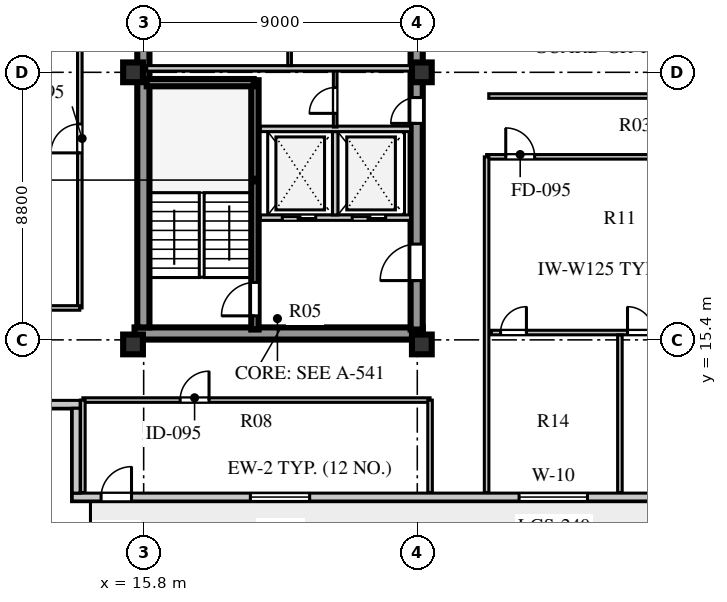
"""IFC4 building model, lengths in metres.
Left out: names, types, materials, properties, quantities, classifications, styles, units other than length and angle.
Written with IfcOpenShell. Run it as: python <this file> out.ifc"""

import sys

from ifc_helpers import new_model, si_unit, direction, frame, frame_2d, origin, origin_2d, place, context, subcontext, project, spatial, rectangle, extrude, element, fill, save


model = new_model("IFC4")
c1 = context("Model", 3, precision=1e-05, world=origin(), true_north=direction((0.0, 1.0)))
c2 = subcontext(c1, "Body", "Model", "MODEL_VIEW")
j1 = project(units=[si_unit("LENGTHUNIT", "METRE"), si_unit("PLANEANGLEUNIT", "RADIAN")], contexts=[c1])
p1 = place(None, origin())
s1 = spatial("IfcSite", under=j1, at=p1, CompositionType="ELEMENT")
p2 = place(p1, origin())
s2 = spatial("IfcBuilding", under=s1, at=p2, CompositionType="ELEMENT")
p3 = place(p2, frame((0.0, 0.0, 320.1)))
s3 = spatial("IfcBuildingStorey", under=s2, at=p3, CompositionType="ELEMENT", Elevation=320.1)
p4 = place(p3, frame((15.5, 15.61, 0.0), z_axis=(0.0, 0.0, 1.0), x_axis=(1.0, 0.0, 0.0)))
e1 = element("IfcWall", 1, at=p4, inside=s3, PredefinedType="SHEAR", context=c2, shape_type="SweptSolid", body=[
    extrude(rectangle(XDim=9.48, YDim=0.4, at=frame_2d((4.74, 0.0))), origin(), (0.0, 0.0, 1.0), 3.56),
])
p5 = place(p3, frame((15.79, 15.81, 0.0), z_axis=(0.0, 0.0, 1.0), x_axis=(0.0, 1.0, 0.0)))
e2 = element("IfcWall", 2, at=p5, inside=s3, PredefinedType="SHEAR", context=c2, shape_type="SweptSolid", body=[
    extrude(rectangle(XDim=25.63, YDim=0.4, at=frame_2d((12.815, 0.0))), origin(), (0.0, 0.0, 1.0), 3.56),
])
p6 = place(p3, frame((24.78, 15.74, 0.0), z_axis=(0.0, 0.0, 1.0), x_axis=(0.0, 1.0, 0.0)))
e3 = element("IfcWall", 3, at=p6, inside=s3, PredefinedType="SHEAR", context=c2, shape_type="SweptSolid", body=[
    extrude(rectangle(XDim=25.76, YDim=0.4, at=frame_2d((12.88, 0.0))), origin(), (0.0, 0.0, 1.0), 3.56),
])
p7 = place(p6, frame((1.61, 0.0, 0.0)))
e4 = element("IfcOpeningElement", 4, at=p7, cuts=e3, PredefinedType="OPENING", context=c2, shape_type="SweptSolid", body=[
    extrude(rectangle(XDim=1.2, YDim=2.1, at=frame_2d((0.6, 1.05))), frame((0.0, 0.21, 0.0), z_axis=(0.0, -1.0, 0.0), x_axis=(1.0, 0.0, 0.0)), (0.0, 0.0, 1.0), 0.42),
])
p8 = place(p6, frame((6.78, 0.0, 0.0)))
e5 = element("IfcOpeningElement", 5, at=p8, cuts=e3, PredefinedType="OPENING", context=c2, shape_type="SweptSolid", body=[
    extrude(rectangle(XDim=0.85, YDim=2.06, at=frame_2d((0.425, 1.03))), frame((0.0, 0.21, 0.0), z_axis=(0.0, -1.0, 0.0), x_axis=(1.0, 0.0, 0.0)), (0.0, 0.0, 1.0), 0.42),
])
p9 = place(p6, frame((12.11, 0.0, 0.0)))
e6 = element("IfcOpeningElement", 6, at=p9, cuts=e3, PredefinedType="OPENING", context=c2, shape_type="SweptSolid", body=[
    extrude(rectangle(XDim=1.5, YDim=2.12, at=frame_2d((0.75, 1.06))), frame((0.0, 0.21, 0.0), z_axis=(0.0, -1.0, 0.0), x_axis=(1.0, 0.0, 0.0)), (0.0, 0.0, 1.0), 0.42),
])
p10 = place(p6, frame((20.11, 0.0, 0.0)))
e7 = element("IfcOpeningElement", 7, at=p10, cuts=e3, PredefinedType="OPENING", context=c2, shape_type="SweptSolid", body=[
    extrude(rectangle(XDim=1.2, YDim=2.12, at=frame_2d((0.6, 1.06))), frame((0.0, 0.21, 0.0), z_axis=(0.0, -1.0, 0.0), x_axis=(1.0, 0.0, 0.0)), (0.0, 0.0, 1.0), 0.42),
])
p11 = place(p6, frame((24.01, 0.0, 0.0)))
e8 = element("IfcOpeningElement", 8, at=p11, cuts=e3, PredefinedType="OPENING", context=c2, shape_type="SweptSolid", body=[
    extrude(rectangle(XDim=0.95, YDim=2.1, at=frame_2d((0.475, 1.05))), frame((0.0, 0.21, 0.0), z_axis=(0.0, -1.0, 0.0), x_axis=(1.0, 0.0, 0.0)), (0.0, 0.0, 1.0), 0.42),
])
for number, where, z_axis, x_axis in (
    (9, (15.45, 15.25, 0.0), (0.0, 0.0, 1.0), (1.0, 0.0, 0.0)),
    (10, (15.45, 24.2, 0.0), (0.0, 0.0, 1.0), (1.0, 0.0, 0.0)),
    (11, (24.95, 15.25, 0.0), (0.0, 0.0, 1.0), (1.0, 0.0, 0.0)),
    (12, (24.95, 24.2, 0.0), (0.0, 0.0, 1.0), (1.0, 0.0, 0.0)),
):
    element("IfcColumn", number, at=place(p3, frame(where, z_axis=z_axis, x_axis=x_axis)), inside=s3, PredefinedType="COLUMN", context=c2, shape_type="SweptSolid", body=[
        extrude(rectangle(XDim=0.65, YDim=0.65, at=origin_2d()), origin(), (0.0, 0.0, 1.0), 3.56),
    ])
p12 = place(p3, frame((13.45, 10.23, 0.0), z_axis=(0.0, 0.0, 1.0), x_axis=(1.0, 0.0, 0.0)))
e13 = element("IfcWall", 13, at=p12, inside=s3, PredefinedType="SOLIDWALL", context=c2, shape_type="SweptSolid", body=[
    extrude(rectangle(XDim=31.7, YDim=0.26, at=frame_2d((15.85, 0.0))), origin(), (0.0, 0.0, 1.0), 3.56),
])
p13 = place(p12, frame((0.95, 0.0, 0.0)))
e14 = element("IfcOpeningElement", 14, at=p13, cuts=e13, PredefinedType="OPENING", context=c2, shape_type="SweptSolid", body=[
    extrude(rectangle(XDim=1.0, YDim=2.05, at=frame_2d((0.5, 1.025))), frame((0.0, 0.14, 0.0), z_axis=(0.0, -1.0, 0.0), x_axis=(1.0, 0.0, 0.0)), (0.0, 0.0, 1.0), 0.28),
])
p14 = place(p12, frame((5.86, 0.0, 0.8)))
e15 = element("IfcOpeningElement", 15, at=p14, cuts=e13, PredefinedType="OPENING", context=c2, shape_type="SweptSolid", body=[
    extrude(rectangle(XDim=1.95, YDim=2.0, at=frame_2d((0.975, 1.0))), frame((0.0, 0.14, 0.0), z_axis=(0.0, -1.0, 0.0), x_axis=(1.0, 0.0, 0.0)), (0.0, 0.0, 1.0), 0.28),
])
p15 = place(p12, frame((14.698, 0.0, 0.8)))
e16 = element("IfcOpeningElement", 16, at=p15, cuts=e13, PredefinedType="OPENING", context=c2, shape_type="SweptSolid", body=[
    extrude(rectangle(XDim=2.25, YDim=2.0, at=frame_2d((1.125, 1.0))), frame((0.0, 0.14, 0.0), z_axis=(0.0, -1.0, 0.0), x_axis=(1.0, 0.0, 0.0)), (0.0, 0.0, 1.0), 0.28),
])
p16 = place(p12, frame((20.958, 0.0, 0.8)))
e17 = element("IfcOpeningElement", 17, at=p16, cuts=e13, PredefinedType="OPENING", context=c2, shape_type="SweptSolid", body=[
    extrude(rectangle(XDim=1.8, YDim=2.0, at=frame_2d((0.9, 1.0))), frame((0.0, 0.14, 0.0), z_axis=(0.0, -1.0, 0.0), x_axis=(1.0, 0.0, 0.0)), (0.0, 0.0, 1.0), 0.28),
])
p17 = place(p12, frame((27.895, 0.0, 0.8)))
e18 = element("IfcOpeningElement", 18, at=p17, cuts=e13, PredefinedType="OPENING", context=c2, shape_type="SweptSolid", body=[
    extrude(rectangle(XDim=1.5, YDim=2.0, at=frame_2d((0.75, 1.0))), frame((0.0, 0.14, 0.0), z_axis=(0.0, -1.0, 0.0), x_axis=(1.0, 0.0, 0.0)), (0.0, 0.0, 1.0), 0.28),
])
p18 = place(p3, frame((10.4, 13.28, 0.0), z_axis=(0.0, 0.0, 1.0), x_axis=(1.0, 0.0, 0.0)))
e19 = element("IfcWall", 19, at=p18, inside=s3, PredefinedType="SOLIDWALL", context=c2, shape_type="SweptSolid", body=[
    extrude(rectangle(XDim=3.31, YDim=0.26, at=frame_2d((1.655, 0.0))), origin(), (0.0, 0.0, 1.0), 3.56),
])
p19 = place(p3, frame((13.58, 13.15, 0.0), z_axis=(0.0, 0.0, 1.0), x_axis=(0.0, -1.0, 0.0)))
e20 = element("IfcWall", 20, at=p19, inside=s3, PredefinedType="SOLIDWALL", context=c2, shape_type="SweptSolid", body=[
    extrude(rectangle(XDim=2.79, YDim=0.26, at=frame_2d((1.395, 0.0))), origin(), (0.0, 0.0, 1.0), 3.56),
])
p20 = place(p3, frame((19.46, 15.74, 0.0), z_axis=(0.0, 0.0, 1.0), x_axis=(0.0, 1.0, 0.0)))
e21 = element("IfcWall", 21, at=p20, inside=s3, PredefinedType="SHEAR", context=c2, shape_type="SweptSolid", body=[
    extrude(rectangle(XDim=8.2, YDim=0.24, at=frame_2d((4.1, 0.0))), origin(), (0.0, 0.0, 1.0), 3.8),
])
p21 = place(p20, frame((0.45, 0.0, 0.0)))
e22 = element("IfcOpeningElement", 22, at=p21, cuts=e21, PredefinedType="OPENING", context=c2, shape_type="SweptSolid", body=[
    extrude(rectangle(XDim=1.1, YDim=2.1, at=frame_2d((0.55, 1.05))), frame((0.0, 0.13, 0.0), z_axis=(0.0, -1.0, 0.0), x_axis=(1.0, 0.0, 0.0)), (0.0, 0.0, 1.0), 0.26),
])
p22 = place(p3, frame((15.9, 23.86, 0.0), z_axis=(0.0, 0.0, 1.0), x_axis=(1.0, 0.0, 0.0)))
e23 = element("IfcWall", 23, at=p22, inside=s3, PredefinedType="SHEAR", context=c2, shape_type="SweptSolid", body=[
    extrude(rectangle(XDim=3.52, YDim=0.24, at=frame_2d((1.76, 0.0))), origin(), (0.0, 0.0, 1.0), 3.8),
])
p23 = place(p3, frame((19.64, 19.42, 0.0), z_axis=(0.0, 0.0, 1.0), x_axis=(1.0, 0.0, 0.0)))
e24 = element("IfcWall", 24, at=p23, inside=s3, PredefinedType="SOLIDWALL", context=c2, shape_type="SweptSolid", body=[
    extrude(rectangle(XDim=4.94, YDim=0.18, at=frame_2d((2.47, 0.0))), origin(), (0.0, 0.0, 1.0), 3.56),
])
p24 = place(p23, frame((0.72, 0.0, 0.0)))
e25 = element("IfcOpeningElement", 25, at=p24, cuts=e24, PredefinedType="OPENING", context=c2, shape_type="SweptSolid", body=[
    extrude(rectangle(XDim=1.1, YDim=2.1, at=frame_2d((0.55, 1.05))), frame((0.0, 0.1, 0.0), z_axis=(0.0, -1.0, 0.0), x_axis=(1.0, 0.0, 0.0)), (0.0, 0.0, 1.0), 0.2),
])
p25 = place(p23, frame((3.02, 0.0, 0.0)))
e26 = element("IfcOpeningElement", 26, at=p25, cuts=e24, PredefinedType="OPENING", context=c2, shape_type="SweptSolid", body=[
    extrude(rectangle(XDim=1.1, YDim=2.1, at=frame_2d((0.55, 1.05))), frame((0.0, 0.1, 0.0), z_axis=(0.0, -1.0, 0.0), x_axis=(1.0, 0.0, 0.0)), (0.0, 0.0, 1.0), 0.2),
])
p26 = place(p3, frame((22.1, 19.51, 0.0), z_axis=(0.0, 0.0, 1.0), x_axis=(0.0, 1.0, 0.0)))
e27 = element("IfcWall", 27, at=p26, inside=s3, PredefinedType="SOLIDWALL", context=c2, shape_type="SweptSolid", body=[
    extrude(rectangle(XDim=2.74, YDim=0.18, at=frame_2d((1.37, 0.0))), origin(), (0.0, 0.0, 1.0), 3.56),
])
p27 = place(p3, frame((19.64, 22.34, 0.0), z_axis=(0.0, 0.0, 1.0), x_axis=(1.0, 0.0, 0.0)))
e28 = element("IfcWall", 28, at=p27, inside=s3, PredefinedType="SOLIDWALL", context=c2, shape_type="SweptSolid", body=[
    extrude(rectangle(XDim=4.94, YDim=0.18, at=frame_2d((2.47, 0.0))), origin(), (0.0, 0.0, 1.0), 3.56),
])
p28 = place(p3, frame((22.1, 22.4, 0.0), z_axis=(0.0, 0.0, 1.0), x_axis=(0.0, 1.0, 0.0)))
e29 = element("IfcWall", 29, at=p28, inside=s3, PredefinedType="PARTITIONING", context=c2, shape_type="SweptSolid", body=[
    extrude(rectangle(XDim=1.88, YDim=0.12, at=frame_2d((0.94, 0.0))), origin(), (0.0, 0.0, 1.0), 3.56),
])
p29 = place(p28, frame((0.45, 0.0, 0.0)))
e30 = element("IfcOpeningElement", 30, at=p29, cuts=e29, PredefinedType="OPENING", context=c2, shape_type="SweptSolid", body=[
    extrude(rectangle(XDim=0.85, YDim=2.06, at=frame_2d((0.425, 1.03))), frame((0.0, 0.07, 0.0), z_axis=(0.0, -1.0, 0.0), x_axis=(1.0, 0.0, 0.0)), (0.0, 0.0, 1.0), 0.14),
])
p30 = place(p3, frame((15.9, 24.33, 0.0), z_axis=(0.0, 0.0, 1.0), x_axis=(1.0, 0.0, 0.0)))
e31 = element("IfcWall", 31, at=p30, inside=s3, PredefinedType="SOLIDWALL", context=c2, shape_type="SweptSolid", body=[
    extrude(rectangle(XDim=8.68, YDim=0.18, at=frame_2d((4.34, 0.0))), origin(), (0.0, 0.0, 1.0), 2.96),
])
p31 = place(p3, frame((20.6, 24.42, 0.0), z_axis=(0.0, 0.0, 1.0), x_axis=(0.0, 1.0, 0.0)))
e32 = element("IfcWall", 32, at=p31, inside=s3, PredefinedType="PARTITIONING", context=c2, shape_type="SweptSolid", body=[
    extrude(rectangle(XDim=2.02, YDim=0.12, at=frame_2d((1.01, 0.0))), origin(), (0.0, 0.0, 1.0), 3.56),
])
p32 = place(p3, frame((27.08, 21.42, 0.0), z_axis=(0.0, 0.0, 1.0), x_axis=(1.0, 0.0, 0.0)))
e33 = element("IfcWall", 33, at=p32, inside=s3, PredefinedType="PARTITIONING", context=c2, shape_type="SweptSolid", body=[
    extrude(rectangle(XDim=12.07, YDim=0.15, at=frame_2d((6.035, 0.0))), origin(), (0.0, 0.0, 1.0), 3.26),
])
p33 = place(p32, frame((0.63, 0.0, 0.0)))
e34 = element("IfcOpeningElement", 34, at=p33, cuts=e33, PredefinedType="OPENING", context=c2, shape_type="SweptSolid", body=[
    extrude(rectangle(XDim=0.95, YDim=2.1, at=frame_2d((0.475, 1.05))), frame((0.0, 0.085, 0.0), z_axis=(0.0, -1.0, 0.0), x_axis=(1.0, 0.0, 0.0)), (0.0, 0.0, 1.0), 0.17),
])
p34 = place(p3, frame((27.08, 10.38, 0.0), z_axis=(0.0, 0.0, 1.0), x_axis=(0.0, 1.0, 0.0)))
e35 = element("IfcWall", 35, at=p34, inside=s3, PredefinedType="PARTITIONING", context=c2, shape_type="SweptSolid", body=[
    extrude(rectangle(XDim=11.04, YDim=0.15, at=frame_2d((5.52, 0.0))), origin(), (0.0, 0.0, 1.0), 3.56),
])
p35 = place(p3, frame((27.15, 23.42, 0.0), z_axis=(0.0, 0.0, 1.0), x_axis=(1.0, 0.0, 0.0)))
e36 = element("IfcWall", 36, at=p35, inside=s3, PredefinedType="PARTITIONING", context=c2, shape_type="SweptSolid", body=[
    extrude(rectangle(XDim=6.0, YDim=0.15, at=frame_2d((3.0, 0.0))), origin(), (0.0, 0.0, 1.0), 3.56),
])
p36 = place(p3, frame((13.8, 13.42, 0.0), z_axis=(0.0, 0.0, 1.0), x_axis=(1.0, 0.0, 0.0)))
e37 = element("IfcWall", 37, at=p36, inside=s3, PredefinedType="PARTITIONING", context=c2, shape_type="SweptSolid", body=[
    extrude(rectangle(XDim=11.42, YDim=0.15, at=frame_2d((5.71, 0.0))), origin(), (0.0, 0.0, 1.0), 3.56),
])
p37 = place(p36, frame((3.2, 0.0, 0.0)))
e38 = element("IfcOpeningElement", 38, at=p37, cuts=e37, PredefinedType="OPENING", context=c2, shape_type="SweptSolid", body=[
    extrude(rectangle(XDim=0.95, YDim=2.08, at=frame_2d((0.475, 1.04))), frame((0.0, 0.085, 0.0), z_axis=(0.0, -1.0, 0.0), x_axis=(1.0, 0.0, 0.0)), (0.0, 0.0, 1.0), 0.17),
])
p38 = place(p3, frame((13.8, 10.38, 0.0), z_axis=(0.0, 0.0, 1.0), x_axis=(0.0, 1.0, 0.0)))
e39 = element("IfcWall", 39, at=p38, inside=s3, PredefinedType="PARTITIONING", context=c2, shape_type="SweptSolid", body=[
    extrude(rectangle(XDim=3.04, YDim=0.15, at=frame_2d((1.52, 0.0))), origin(), (0.0, 0.0, 1.0), 3.56),
])
p39 = place(p3, frame((25.22, 10.38, 0.0), z_axis=(0.0, 0.0, 1.0), x_axis=(0.0, 1.0, 0.0)))
e40 = element("IfcWall", 40, at=p39, inside=s3, PredefinedType="PARTITIONING", context=c2, shape_type="SweptSolid", body=[
    extrude(rectangle(XDim=3.04, YDim=0.15, at=frame_2d((1.52, 0.0))), origin(), (0.0, 0.0, 1.0), 3.11),
])
p40 = place(p3, frame((13.7, 16.45, 0.0), z_axis=(0.0, 0.0, 1.0), x_axis=(0.0, 1.0, 0.0)))
e41 = element("IfcWall", 41, at=p40, inside=s3, PredefinedType="PARTITIONING", context=c2, shape_type="SweptSolid", body=[
    extrude(rectangle(XDim=24.3, YDim=0.15, at=frame_2d((12.15, 0.0))), origin(), (0.0, 0.0, 1.0), 3.56),
])
p41 = place(p40, frame((5.1, 0.0, 0.0)))
e42 = element("IfcOpeningElement", 42, at=p41, cuts=e41, PredefinedType="OPENING", context=c2, shape_type="SweptSolid", body=[
    extrude(rectangle(XDim=0.95, YDim=2.08, at=frame_2d((0.475, 1.04))), frame((0.0, 0.085, 0.0), z_axis=(0.0, -1.0, 0.0), x_axis=(1.0, 0.0, 0.0)), (0.0, 0.0, 1.0), 0.17),
])
p42 = place(p3, frame((10.68, 16.45, 0.0), z_axis=(0.0, 0.0, 1.0), x_axis=(1.0, 0.0, 0.0)))
e43 = element("IfcWall", 43, at=p42, inside=s3, PredefinedType="PARTITIONING", context=c2, shape_type="SweptSolid", body=[
    extrude(rectangle(XDim=3.02, YDim=0.15, at=frame_2d((1.51, 0.0))), origin(), (0.0, 0.0, 1.0), 3.56),
])
p43 = place(p3, frame((27.24, 15.641, 0.0), z_axis=(0.0, 0.0, 1.0), x_axis=(1.0, 0.0, 0.0)))
e44 = element("IfcWall", 44, at=p43, inside=s3, PredefinedType="PARTITIONING", context=c2, shape_type="SweptSolid", body=[
    extrude(rectangle(XDim=11.83, YDim=0.15, at=frame_2d((5.915, 0.0))), origin(), (0.0, 0.0, 1.0), 3.56),
])
p44 = place(p43, frame((0.3, 0.0, 0.0)))
e45 = element("IfcOpeningElement", 45, at=p44, cuts=e44, PredefinedType="OPENING", context=c2, shape_type="SweptSolid", body=[
    extrude(rectangle(XDim=0.85, YDim=2.08, at=frame_2d((0.425, 1.04))), frame((0.0, 0.085, 0.0), z_axis=(0.0, -1.0, 0.0), x_axis=(1.0, 0.0, 0.0)), (0.0, 0.0, 1.0), 0.17),
])
p45 = place(p43, frame((4.475, 0.0, 0.0)))
e46 = element("IfcOpeningElement", 46, at=p45, cuts=e44, PredefinedType="OPENING", context=c2, shape_type="SweptSolid", body=[
    extrude(rectangle(XDim=0.85, YDim=2.08, at=frame_2d((0.425, 1.04))), frame((0.0, 0.085, 0.0), z_axis=(0.0, -1.0, 0.0), x_axis=(1.0, 0.0, 0.0)), (0.0, 0.0, 1.0), 0.17),
])
p46 = place(p3, frame((31.465, 10.38, 0.0), z_axis=(0.0, 0.0, 1.0), x_axis=(0.0, 1.0, 0.0)))
e47 = element("IfcWall", 47, at=p46, inside=s3, PredefinedType="PARTITIONING", context=c2, shape_type="SweptSolid", body=[
    extrude(rectangle(XDim=5.181, YDim=0.15, at=frame_2d((2.591, 0.0))), origin(), (0.0, 0.0, 1.0), 3.56),
])
p47 = place(p13, frame((1.0, 0.0, 0.0), z_axis=(0.0, 0.0, 1.0), x_axis=(-1.0, 0.0, 0.0)))
e48 = element("IfcDoor", 48, at=p47, inside=s3, OperationType="SINGLE_SWING_LEFT", PredefinedType="DOOR", context=c2, shape_type="SweptSolid", body=[
    extrude(rectangle(XDim=1.0, YDim=2.05, at=frame_2d((0.5, 1.025))), frame((0.0, 0.025, 0.0), z_axis=(0.0, -1.0, 0.0), x_axis=(1.0, 0.0, 0.0)), (0.0, 0.0, 1.0), 0.05),
])
fill(e14, e48)
p48 = place(p14, origin())
e49 = element("IfcWindow", 49, at=p48, inside=s3, PartitioningType="SINGLE_PANEL", PredefinedType="WINDOW", context=c2, shape_type="SweptSolid", body=[
    extrude(rectangle(XDim=1.95, YDim=2.0, at=frame_2d((0.975, 1.0))), frame((0.0, 0.03, 0.0), z_axis=(0.0, -1.0, 0.0), x_axis=(1.0, 0.0, 0.0)), (0.0, 0.0, 1.0), 0.06),
])
fill(e15, e49)
p49 = place(p15, origin())
e50 = element("IfcWindow", 50, at=p49, inside=s3, PartitioningType="SINGLE_PANEL", PredefinedType="WINDOW", context=c2, shape_type="SweptSolid", body=[
    extrude(rectangle(XDim=2.25, YDim=2.0, at=frame_2d((1.125, 1.0))), frame((0.0, 0.03, 0.0), z_axis=(0.0, -1.0, 0.0), x_axis=(1.0, 0.0, 0.0)), (0.0, 0.0, 1.0), 0.06),
])
fill(e16, e50)
p50 = place(p21, origin())
e51 = element("IfcDoor", 51, at=p50, inside=s3, OperationType="SINGLE_SWING_LEFT", PredefinedType="DOOR", context=c2, shape_type="SweptSolid", body=[
    extrude(rectangle(XDim=1.1, YDim=2.1, at=frame_2d((0.55, 1.05))), frame((0.0, 0.025, 0.0), z_axis=(0.0, -1.0, 0.0), x_axis=(1.0, 0.0, 0.0)), (0.0, 0.0, 1.0), 0.05),
])
fill(e22, e51)
p51 = place(p24, origin())
e52 = element("IfcDoor", 52, at=p51, inside=s3, OperationType="DOUBLE_DOOR_SLIDING", PredefinedType="DOOR", context=c2, shape_type="SweptSolid", body=[
    extrude(rectangle(XDim=1.1, YDim=2.1, at=frame_2d((0.55, 1.05))), frame((0.0, 0.025, 0.0), z_axis=(0.0, -1.0, 0.0), x_axis=(1.0, 0.0, 0.0)), (0.0, 0.0, 1.0), 0.05),
])
fill(e25, e52)
p52 = place(p25, origin())
e53 = element("IfcDoor", 53, at=p52, inside=s3, OperationType="DOUBLE_DOOR_SLIDING", PredefinedType="DOOR", context=c2, shape_type="SweptSolid", body=[
    extrude(rectangle(XDim=1.1, YDim=2.1, at=frame_2d((0.55, 1.05))), frame((0.0, 0.025, 0.0), z_axis=(0.0, -1.0, 0.0), x_axis=(1.0, 0.0, 0.0)), (0.0, 0.0, 1.0), 0.05),
])
fill(e26, e53)
p53 = place(p7, frame((1.2, 0.0, 0.0), z_axis=(0.0, 0.0, 1.0), x_axis=(-1.0, 0.0, 0.0)))
e54 = element("IfcDoor", 54, at=p53, inside=s3, OperationType="SINGLE_SWING_RIGHT", PredefinedType="DOOR", context=c2, shape_type="SweptSolid", body=[
    extrude(rectangle(XDim=1.2, YDim=2.1, at=frame_2d((0.6, 1.05))), frame((0.0, 0.025, 0.0), z_axis=(0.0, -1.0, 0.0), x_axis=(1.0, 0.0, 0.0)), (0.0, 0.0, 1.0), 0.05),
])
fill(e4, e54)
p54 = place(p29, origin())
e55 = element("IfcDoor", 55, at=p54, inside=s3, OperationType="SINGLE_SWING_LEFT", PredefinedType="DOOR", context=c2, shape_type="SweptSolid", body=[
    extrude(rectangle(XDim=0.85, YDim=2.06, at=frame_2d((0.425, 1.03))), frame((0.0, 0.025, 0.0), z_axis=(0.0, -1.0, 0.0), x_axis=(1.0, 0.0, 0.0)), (0.0, 0.0, 1.0), 0.05),
])
fill(e30, e55)
p55 = place(p8, frame((0.85, 0.0, 0.0), z_axis=(0.0, 0.0, 1.0), x_axis=(-1.0, 0.0, 0.0)))
e56 = element("IfcDoor", 56, at=p55, inside=s3, OperationType="SINGLE_SWING_RIGHT", PredefinedType="DOOR", context=c2, shape_type="SweptSolid", body=[
    extrude(rectangle(XDim=0.85, YDim=2.06, at=frame_2d((0.425, 1.03))), frame((0.0, 0.025, 0.0), z_axis=(0.0, -1.0, 0.0), x_axis=(1.0, 0.0, 0.0)), (0.0, 0.0, 1.0), 0.05),
])
fill(e5, e56)
p56 = place(p37, frame((0.95, 0.0, 0.0), z_axis=(0.0, 0.0, 1.0), x_axis=(-1.0, 0.0, 0.0)))
e57 = element("IfcDoor", 57, at=p56, inside=s3, OperationType="SINGLE_SWING_LEFT", PredefinedType="DOOR", context=c2, shape_type="SweptSolid", body=[
    extrude(rectangle(XDim=0.95, YDim=2.08, at=frame_2d((0.475, 1.04))), frame((0.0, 0.025, 0.0), z_axis=(0.0, -1.0, 0.0), x_axis=(1.0, 0.0, 0.0)), (0.0, 0.0, 1.0), 0.05),
])
fill(e38, e57)
p57 = place(p41, origin())
e58 = element("IfcDoor", 58, at=p57, inside=s3, OperationType="SINGLE_SWING_LEFT", PredefinedType="DOOR", context=c2, shape_type="SweptSolid", body=[
    extrude(rectangle(XDim=0.95, YDim=2.08, at=frame_2d((0.475, 1.04))), frame((0.0, 0.025, 0.0), z_axis=(0.0, -1.0, 0.0), x_axis=(1.0, 0.0, 0.0)), (0.0, 0.0, 1.0), 0.05),
])
fill(e42, e58)
p58 = place(p44, frame((0.85, 0.0, 0.0), z_axis=(0.0, 0.0, 1.0), x_axis=(-1.0, 0.0, 0.0)))
e59 = element("IfcDoor", 59, at=p58, inside=s3, OperationType="SINGLE_SWING_LEFT", PredefinedType="DOOR", context=c2, shape_type="SweptSolid", body=[
    extrude(rectangle(XDim=0.85, YDim=2.08, at=frame_2d((0.425, 1.04))), frame((0.0, 0.025, 0.0), z_axis=(0.0, -1.0, 0.0), x_axis=(1.0, 0.0, 0.0)), (0.0, 0.0, 1.0), 0.05),
])
fill(e45, e59)
p59 = place(p45, frame((0.85, 0.0, 0.0), z_axis=(0.0, 0.0, 1.0), x_axis=(-1.0, 0.0, 0.0)))
e60 = element("IfcDoor", 60, at=p59, inside=s3, OperationType="SINGLE_SWING_RIGHT", PredefinedType="DOOR", context=c2, shape_type="SweptSolid", body=[
    extrude(rectangle(XDim=0.85, YDim=2.08, at=frame_2d((0.425, 1.04))), frame((0.0, 0.025, 0.0), z_axis=(0.0, -1.0, 0.0), x_axis=(1.0, 0.0, 0.0)), (0.0, 0.0, 1.0), 0.05),
])
fill(e46, e60)
p60 = place(p33, frame((0.95, 0.0, 0.0), z_axis=(0.0, 0.0, 1.0), x_axis=(-1.0, 0.0, 0.0)))
e61 = element("IfcDoor", 61, at=p60, inside=s3, OperationType="SINGLE_SWING_RIGHT", PredefinedType="DOOR", context=c2, shape_type="SweptSolid", body=[
    extrude(rectangle(XDim=0.95, YDim=2.1, at=frame_2d((0.475, 1.05))), frame((0.0, 0.025, 0.0), z_axis=(0.0, -1.0, 0.0), x_axis=(1.0, 0.0, 0.0)), (0.0, 0.0, 1.0), 0.05),
])
fill(e34, e61)
save(model, sys.argv[1])
